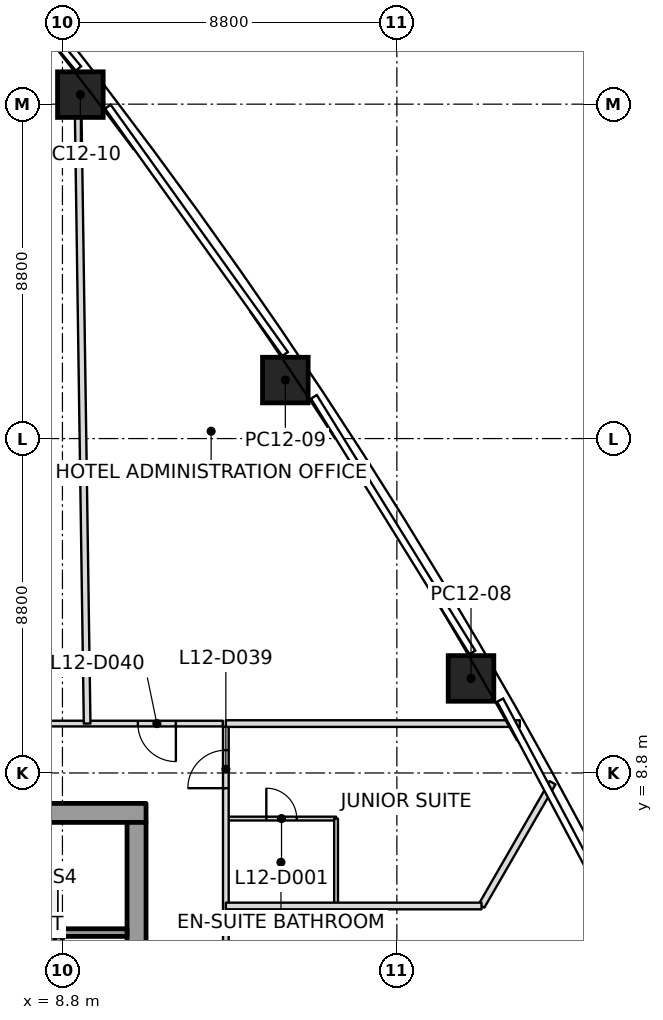
"""IFC4 building model, lengths in metres.
Left out: names, types, materials, properties, quantities, classifications, styles, units other than length and angle.
Written with IfcOpenShell. Run it as: python <this file> out.ifc"""

import sys

from ifc_helpers import new_model, si_unit, direction, frame, frame_2d, origin, origin_2d, place, context, subcontext, project, spatial, rectangle, extrude, element, fill, save


model = new_model("IFC4")
c1 = context("Model", 3, precision=1e-05, world=origin(), true_north=direction((0.0, 1.0)))
c2 = subcontext(c1, "Body", "Model", "MODEL_VIEW")
j1 = project(units=[si_unit("LENGTHUNIT", "METRE"), si_unit("PLANEANGLEUNIT", "RADIAN")], contexts=[c1])
p1 = place(None, origin())
s1 = spatial("IfcSite", under=j1, at=p1, CompositionType="ELEMENT")
p2 = place(p1, origin())
s2 = spatial("IfcBuilding", under=s1, at=p2, CompositionType="ELEMENT")
p3 = place(p2, frame((0.0, 0.0, 66.5)))
s3 = spatial("IfcBuildingStorey", under=s2, at=p3, CompositionType="ELEMENT", Elevation=66.5)
p4 = place(p3, frame((19.551, 11.288, 0.0), z_axis=(-0.010622752832, -0.006202104138, 0.999924342651), x_axis=(-0.499971788485, 0.866041689005, 6.0208566e-05)))
e1 = element("IfcColumn", 1, at=p4, inside=s3, PredefinedType="COLUMN", context=c2, shape_type="SweptSolid", body=[
    extrude(rectangle(XDim=1.2, YDim=1.2, at=origin_2d()), origin(), (0.0, 0.0, 1.0), 3.7),
])
p5 = place(p3, frame((14.665, 19.139, 0.0), z_axis=(-0.005674016471, -0.014382971985, 0.999880460682), x_axis=(-0.55608940167, 0.831075900632, 0.008799132814)))
e2 = element("IfcColumn", 2, at=p5, inside=s3, PredefinedType="COLUMN", context=c2, shape_type="SweptSolid", body=[
    extrude(rectangle(XDim=1.2, YDim=1.2, at=origin_2d()), origin(), (0.0, 0.0, 1.0), 3.7),
])
p6 = place(p3, frame((9.271, 26.651, 0.0), z_axis=(-0.000131936642, -0.022363260764, 0.999749902306), x_axis=(-0.609768966544, 0.792382791817, 0.017644224909)))
e3 = element("IfcColumn", 3, at=p6, inside=s3, PredefinedType="COLUMN", context=c2, shape_type="SweptSolid", body=[
    extrude(rectangle(XDim=1.2, YDim=1.2, at=origin_2d()), origin(), (0.0, 0.0, 1.0), 3.701),
])
p7 = place(p3, frame((-11.0, 7.75, 0.0), z_axis=(0.0, 0.0, 1.0), x_axis=(1.0, 0.0, 0.0)))
e4 = element("IfcWall", 4, at=p7, inside=s3, PredefinedType="SHEAR", context=c2, shape_type="SweptSolid", body=[
    extrude(rectangle(XDim=22.0, YDim=0.5, at=frame_2d((11.0, 0.0))), origin(), (0.0, 0.0, 1.0), 3.7),
])
p8 = place(p7, frame((10.45, 0.0, 0.0)))
e5 = element("IfcOpeningElement", 5, at=p8, cuts=e4, PredefinedType="OPENING", context=c2, shape_type="SweptSolid", body=[
    extrude(rectangle(XDim=1.1, YDim=2.1, at=frame_2d((0.55, 1.05))), frame((0.0, 0.25, 0.0), z_axis=(0.0, -1.0, 0.0), x_axis=(1.0, 0.0, 0.0)), (0.0, 0.0, 1.0), 0.5),
])
p9 = place(p3, frame((10.75, -7.5, 0.0), z_axis=(0.0, 0.0, 1.0), x_axis=(0.0, 1.0, 0.0)))
e6 = element("IfcWall", 6, at=p9, inside=s3, PredefinedType="SHEAR", context=c2, shape_type="SweptSolid", body=[
    extrude(rectangle(XDim=15.0, YDim=0.5, at=frame_2d((7.5, 0.0))), origin(), (0.0, 0.0, 1.0), 3.7),
])
p10 = place(p9, frame((6.6, 0.0, 0.0)))
e7 = element("IfcOpeningElement", 7, at=p10, cuts=e6, PredefinedType="OPENING", context=c2, shape_type="SweptSolid", body=[
    extrude(rectangle(XDim=1.8, YDim=2.1, at=frame_2d((0.9, 1.05))), frame((0.0, 0.25, 0.0), z_axis=(0.0, -1.0, 0.0), x_axis=(1.0, 0.0, 0.0)), (0.0, 0.0, 1.0), 0.5),
])
p11 = place(p3, frame((8.7, 4.6, 0.0), z_axis=(0.0, 0.0, 1.0), x_axis=(-1.0, 0.0, 0.0)))
e8 = element("IfcWall", 8, at=p11, inside=s3, PredefinedType="SOLIDWALL", context=c2, shape_type="SweptSolid", body=[
    extrude(rectangle(XDim=2.6, YDim=0.2, at=frame_2d((1.3, 0.0))), origin(), (0.0, 0.0, 1.0), 3.55),
])
p12 = place(p3, frame((8.7, 4.6, 0.0), z_axis=(0.0, 0.0, 1.0), x_axis=(0.0, -1.0, 0.0)))
e9 = element("IfcWall", 9, at=p12, inside=s3, PredefinedType="SOLIDWALL", context=c2, shape_type="SweptSolid", body=[
    extrude(rectangle(XDim=2.8, YDim=0.2, at=frame_2d((1.4, 0.0))), origin(), (0.0, 0.0, 1.0), 3.55),
])
p13 = place(p3, frame((10.5, 4.6, 0.0), z_axis=(0.0, 0.0, 1.0), x_axis=(-1.0, 0.0, 0.0)))
e10 = element("IfcWall", 10, at=p13, inside=s3, PredefinedType="SOLIDWALL", context=c2, shape_type="SweptSolid", body=[
    extrude(rectangle(XDim=1.8, YDim=0.2, at=frame_2d((0.9, 0.0))), origin(), (0.0, 0.0, 1.0), 3.55),
])
p14 = place(p3, frame((9.198, 27.265, 0.0), z_axis=(0.0, 0.0, 1.0), x_axis=(0.014662890242, -0.999892494046, 0.0)))
e11 = element("IfcWall", 11, at=p14, inside=s3, PredefinedType="PARTITIONING", context=c2, shape_type="SweptSolid", body=[
    extrude(rectangle(XDim=17.167, YDim=0.175, at=frame_2d((8.583, 0.0))), origin(), (0.0, 0.0, 1.0), 2.947),
])
p15 = place(p3, frame((21.698, 8.542, 0.0), z_axis=(0.0, 0.0, 1.0), x_axis=(-0.499976540837, -0.866038947515, 0.0)))
e12 = element("IfcWall", 12, at=p15, inside=s3, PredefinedType="PARTITIONING", context=c2, shape_type="SweptSolid", body=[
    extrude(rectangle(XDim=3.743, YDim=0.175, at=frame_2d((1.872, 0.0))), origin(), (0.0, 0.0, 1.0), 2.934),
])
p16 = place(p3, frame((19.827, 5.3, 0.0), z_axis=(0.0, 0.0, 1.0), x_axis=(-1.0, 0.0, 0.0)))
e13 = element("IfcWall", 13, at=p16, inside=s3, PredefinedType="PARTITIONING", context=c2, shape_type="SweptSolid", body=[
    extrude(rectangle(XDim=6.727, YDim=0.175, at=frame_2d((3.363, 0.0))), origin(), (0.0, 0.0, 1.0), 3.093),
])
p17 = place(p3, frame((13.1, 10.1, 0.0), z_axis=(0.0, 0.0, 1.0), x_axis=(1.0, 0.0, 0.0)))
e14 = element("IfcWall", 14, at=p17, inside=s3, PredefinedType="PARTITIONING", context=c2, shape_type="SweptSolid", body=[
    extrude(rectangle(XDim=7.735, YDim=0.175, at=frame_2d((3.867, 0.0))), origin(), (0.0, 0.0, 1.0), 2.934),
])
p18 = place(p3, frame((13.02, 10.1, 0.0), z_axis=(0.0, 0.0, 1.0), x_axis=(-1.0, 0.0, 0.0)))
e15 = element("IfcWall", 15, at=p18, inside=s3, PredefinedType="PARTITIONING", context=c2, shape_type="SweptSolid", body=[
    extrude(rectangle(XDim=11.97, YDim=0.15, at=frame_2d((5.985, 0.0))), origin(), (0.0, 0.0, 1.0), 2.947),
])
p19 = place(p18, frame((1.235, 0.0, 0.0)))
e16 = element("IfcOpeningElement", 16, at=p19, cuts=e15, PredefinedType="OPENING", context=c2, shape_type="SweptSolid", body=[
    extrude(rectangle(XDim=1.0, YDim=2.1, at=frame_2d((0.5, 1.05))), frame((0.0, 0.075, 0.0), z_axis=(0.0, -1.0, 0.0), x_axis=(1.0, 0.0, 0.0)), (0.0, 0.0, 1.0), 0.15),
])
p20 = place(p3, frame((13.1, -6.351, 0.0), z_axis=(0.0, 0.0, 1.0), x_axis=(0.0, 1.0, 0.0)))
e17 = element("IfcWall", 17, at=p20, inside=s3, PredefinedType="PARTITIONING", context=c2, shape_type="SweptSolid", body=[
    extrude(rectangle(XDim=16.371, YDim=0.15, at=frame_2d((8.186, 0.0))), origin(), (0.0, 0.0, 1.0), 3.017),
])
p21 = place(p20, frame((14.751, 0.0, 0.0)))
e18 = element("IfcOpeningElement", 18, at=p21, cuts=e17, PredefinedType="OPENING", context=c2, shape_type="SweptSolid", body=[
    extrude(rectangle(XDim=1.0, YDim=2.1, at=frame_2d((0.5, 1.05))), frame((0.0, 0.075, 0.0), z_axis=(0.0, -1.0, 0.0), x_axis=(1.0, 0.0, 0.0)), (0.0, 0.0, 1.0), 0.15),
])
p22 = place(p20, frame((6.525, 0.0, 0.0)))
e19 = element("IfcOpeningElement", 19, at=p22, cuts=e17, PredefinedType="OPENING", context=c2, shape_type="SweptSolid", body=[
    extrude(rectangle(XDim=1.0, YDim=2.1, at=frame_2d((0.5, 1.05))), frame((0.0, 0.075, 0.0), z_axis=(0.0, -1.0, 0.0), x_axis=(1.0, 0.0, 0.0)), (0.0, 0.0, 1.0), 0.15),
])
p23 = place(p3, frame((13.13, 7.6, 0.0), z_axis=(0.0, 0.0, 1.0), x_axis=(1.0, 0.0, 0.0)))
e20 = element("IfcWall", 20, at=p23, inside=s3, PredefinedType="PARTITIONING", context=c2, shape_type="SweptSolid", body=[
    extrude(rectangle(XDim=2.87, YDim=0.1, at=frame_2d((1.435, 0.0))), origin(), (0.0, 0.0, 1.0), 3.15),
])
p24 = place(p23, frame((1.035, 0.0, 0.0)))
e21 = element("IfcOpeningElement", 21, at=p24, cuts=e20, PredefinedType="OPENING", context=c2, shape_type="SweptSolid", body=[
    extrude(rectangle(XDim=0.8, YDim=2.1, at=frame_2d((0.4, 1.05))), frame((0.0, 0.05, 0.0), z_axis=(0.0, -1.0, 0.0), x_axis=(1.0, 0.0, 0.0)), (0.0, 0.0, 1.0), 0.1),
])
p25 = place(p3, frame((16.0, 7.6, 0.0), z_axis=(0.0, 0.0, 1.0), x_axis=(0.0, -1.0, 0.0)))
e22 = element("IfcWall", 22, at=p25, inside=s3, PredefinedType="PARTITIONING", context=c2, shape_type="SweptSolid", body=[
    extrude(rectangle(XDim=2.27, YDim=0.1, at=frame_2d((1.135, 0.0))), origin(), (0.0, 0.0, 1.0), 3.093),
])
p26 = place(p21, origin())
e23 = element("IfcDoor", 23, at=p26, inside=s3, OperationType="SINGLE_SWING_LEFT", PredefinedType="DOOR", context=c2, shape_type="SweptSolid", body=[
    extrude(rectangle(XDim=1.0, YDim=2.1, at=frame_2d((0.5, 1.05))), frame((0.0, 0.025, 0.0), z_axis=(0.0, -1.0, 0.0), x_axis=(1.0, 0.0, 0.0)), (0.0, 0.0, 1.0), 0.05),
])
fill(e18, e23)
p27 = place(p24, origin())
e24 = element("IfcDoor", 24, at=p27, inside=s3, OperationType="SINGLE_SWING_LEFT", PredefinedType="DOOR", context=c2, shape_type="SweptSolid", body=[
    extrude(rectangle(XDim=0.8, YDim=2.1, at=frame_2d((0.4, 1.05))), frame((0.0, 0.025, 0.0), z_axis=(0.0, -1.0, 0.0), x_axis=(1.0, 0.0, 0.0)), (0.0, 0.0, 1.0), 0.05),
])
fill(e21, e24)
p28 = place(p19, origin())
e25 = element("IfcDoor", 25, at=p28, inside=s3, OperationType="SINGLE_SWING_LEFT", PredefinedType="DOOR", context=c2, shape_type="SweptSolid", body=[
    extrude(rectangle(XDim=1.0, YDim=2.1, at=frame_2d((0.5, 1.05))), frame((0.0, 0.025, 0.0), z_axis=(0.0, -1.0, 0.0), x_axis=(1.0, 0.0, 0.0)), (0.0, 0.0, 1.0), 0.05),
])
fill(e16, e25)
save(model, sys.argv[1])
